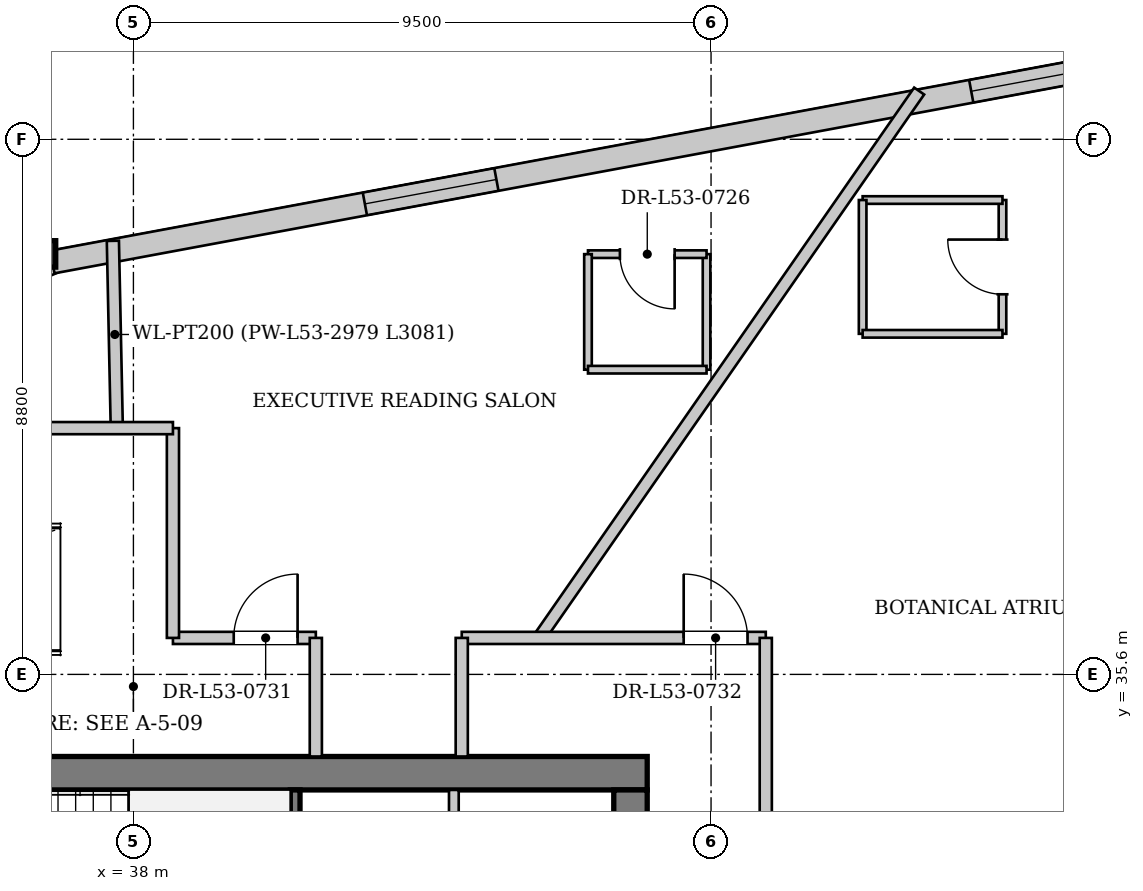
"""IFC4 building model, lengths in metres.
Left out: names, types, materials, properties, quantities, classifications, styles, units other than length and angle.
Written with IfcOpenShell. Run it as: python <this file> out.ifc"""

import sys

from ifc_helpers import new_model, si_unit, direction, frame, frame_2d, origin, origin_2d, place, context, subcontext, project, spatial, rectangle, i_section, extrude, source, transform, mapped, element, fill, save


model = new_model("IFC4")
c1 = context("Model", 3, precision=1e-05, world=origin(), true_north=direction((0.0, 1.0)))
c2 = subcontext(c1, "Body", "Model", "MODEL_VIEW")
j1 = project(units=[si_unit("LENGTHUNIT", "METRE"), si_unit("PLANEANGLEUNIT", "RADIAN")], contexts=[c1])
p1 = place(None, origin())
s1 = spatial("IfcSite", under=j1, at=p1, CompositionType="ELEMENT")
p2 = place(p1, origin())
s2 = spatial("IfcBuilding", under=s1, at=p2, CompositionType="ELEMENT")
p3 = place(p2, frame((0.0, 0.0, 200.3)))
s3 = spatial("IfcBuildingStorey", under=s2, at=p3, CompositionType="ELEMENT", Elevation=200.3)
m1 = source(origin(), c2, "Body", "SweptSolid", [
    extrude(i_section(OverallWidth=0.412, OverallDepth=0.435, WebThickness=0.031, FlangeThickness=0.05, at=origin_2d()), origin(), (0.0, 0.0, 1.0), 3.844),
])
p4 = place(p3, frame((36.633, 42.569, 0.0), z_axis=(-0.060597679022, -0.028139173802, 0.997765557731), x_axis=(0.421167171442, -0.906983028342, 0.0)))
e1 = element("IfcColumn", 1, at=p4, inside=s3, PredefinedType="COLUMN", context=c2, shape_type="MappedRepresentation", body=[
    mapped(m1, transform((0.0, 0.0, 0.0), x_axis=(1.0, 0.0, 0.0), y_axis=(0.0, 1.0, 0.0), z_axis=(0.0, 0.0, 1.0), scale=1.0)),
])
p5 = place(p3, frame((15.966, 33.426, 0.0), z_axis=(0.0, 0.0, 1.0), x_axis=(0.917865013835, 0.396892701341, 0.0)))
e2 = element("IfcWall", 2, at=p5, inside=s3, PredefinedType="SOLIDWALL", context=c2, shape_type="SweptSolid", body=[
    extrude(rectangle(XDim=22.598, YDim=0.38, at=frame_2d((11.299, 0.0))), origin(), (0.0, 0.0, 1.0), 2.972),
])
p6 = place(p5, frame((5.977, 0.0, 0.602)))
e3 = element("IfcOpeningElement", 3, at=p6, cuts=e2, PredefinedType="OPENING", context=c2, shape_type="SweptSolid", body=[
    extrude(rectangle(XDim=2.2, YDim=2.25, at=frame_2d((1.1, 1.125))), frame((0.0, 0.2, 0.0), z_axis=(0.0, -1.0, 0.0), x_axis=(1.0, 0.0, 0.0)), (0.0, 0.0, 1.0), 0.4),
])
p7 = place(p5, frame((16.27, 0.0, 0.602)))
e4 = element("IfcOpeningElement", 4, at=p7, cuts=e2, PredefinedType="OPENING", context=c2, shape_type="SweptSolid", body=[
    extrude(rectangle(XDim=2.2, YDim=2.25, at=frame_2d((1.1, 1.125))), frame((0.0, 0.2, 0.0), z_axis=(0.0, -1.0, 0.0), x_axis=(1.0, 0.0, 0.0)), (0.0, 0.0, 1.0), 0.4),
])
p8 = place(p3, frame((36.667, 42.383, 0.0), z_axis=(0.0, 0.0, 1.0), x_axis=(0.983180478303, 0.182636653177, 0.0)))
e5 = element("IfcWall", 5, at=p8, inside=s3, PredefinedType="SOLIDWALL", context=c2, shape_type="SweptSolid", body=[
    extrude(rectangle(XDim=22.598, YDim=0.38, at=frame_2d((11.299, 0.0))), origin(), (0.0, 0.0, 1.0), 2.972),
])
p9 = place(p8, frame((5.227, 0.0, 0.602)))
e6 = element("IfcOpeningElement", 6, at=p9, cuts=e5, PredefinedType="OPENING", context=c2, shape_type="SweptSolid", body=[
    extrude(rectangle(XDim=2.2, YDim=2.25, at=frame_2d((1.1, 1.125))), frame((0.0, 0.2, 0.0), z_axis=(0.0, -1.0, 0.0), x_axis=(1.0, 0.0, 0.0)), (0.0, 0.0, 1.0), 0.4),
])
p10 = place(p8, frame((15.37, 0.0, 0.602)))
e7 = element("IfcOpeningElement", 7, at=p10, cuts=e5, PredefinedType="OPENING", context=c2, shape_type="SweptSolid", body=[
    extrude(rectangle(XDim=2.2, YDim=2.25, at=frame_2d((1.1, 1.125))), frame((0.0, 0.2, 0.0), z_axis=(0.0, -1.0, 0.0), x_axis=(1.0, 0.0, 0.0)), (0.0, 0.0, 1.0), 0.4),
])
p11 = place(p3, frame((60.64, 44.466, 0.0), z_axis=(0.0, 0.0, 1.0), x_axis=(-0.331792792619, -0.94335228985, 0.0)))
e8 = element("IfcWall", 8, at=p11, inside=s3, PredefinedType="SOLIDWALL", context=c2, shape_type="SweptSolid", body=[
    extrude(rectangle(XDim=23.163, YDim=0.38, at=frame_2d((11.582, 0.0))), origin(), (0.0, 0.0, 1.0), 2.972),
])
p12 = place(p11, frame((5.386, 0.0, 0.602)))
e9 = element("IfcOpeningElement", 9, at=p12, cuts=e8, PredefinedType="OPENING", context=c2, shape_type="SweptSolid", body=[
    extrude(rectangle(XDim=2.2, YDim=2.25, at=frame_2d((1.1, 1.125))), frame((0.0, 0.2, 0.0), z_axis=(0.0, -1.0, 0.0), x_axis=(1.0, 0.0, 0.0)), (0.0, 0.0, 1.0), 0.4),
])
p13 = place(p11, frame((16.027, 0.0, 0.602)))
e10 = element("IfcOpeningElement", 10, at=p13, cuts=e8, PredefinedType="OPENING", context=c2, shape_type="SweptSolid", body=[
    extrude(rectangle(XDim=2.2, YDim=2.25, at=frame_2d((1.1, 1.125))), frame((0.0, 0.2, 0.0), z_axis=(0.0, -1.0, 0.0), x_axis=(1.0, 0.0, 0.0)), (0.0, 0.0, 1.0), 0.4),
])
p14 = place(p3, frame((29.55, 33.975, 0.0), z_axis=(0.0, 0.0, 1.0), x_axis=(1.0, 0.0, 0.0)))
e11 = element("IfcWall", 11, at=p14, inside=s3, PredefinedType="SHEAR", context=c2, shape_type="SweptSolid", body=[
    extrude(rectangle(XDim=16.9, YDim=0.55, at=frame_2d((8.45, 0.0))), origin(), (0.0, 0.0, 1.0), 3.58),
])
p15 = place(p14, frame((1.55, 0.0, 0.0)))
e12 = element("IfcOpeningElement", 12, at=p15, cuts=e11, PredefinedType="OPENING", context=c2, shape_type="SweptSolid", body=[
    extrude(rectangle(XDim=0.95, YDim=2.1, at=frame_2d((0.475, 1.05))), frame((0.0, 0.285, 0.0), z_axis=(0.0, -1.0, 0.0), x_axis=(1.0, 0.0, 0.0)), (0.0, 0.0, 1.0), 0.57),
])
p16 = place(p14, frame((3.93, 0.0, 0.0)))
e13 = element("IfcOpeningElement", 13, at=p16, cuts=e11, PredefinedType="OPENING", context=c2, shape_type="SweptSolid", body=[
    extrude(rectangle(XDim=1.32, YDim=2.2, at=frame_2d((0.66, 1.1))), frame((0.0, 0.285, 0.0), z_axis=(0.0, -1.0, 0.0), x_axis=(1.0, 0.0, 0.0)), (0.0, 0.0, 1.0), 0.57),
])
p17 = place(p3, frame((46.175, 33.7, 0.0), z_axis=(0.0, 0.0, 1.0), x_axis=(0.0, -1.0, 0.0)))
e14 = element("IfcWall", 14, at=p17, inside=s3, PredefinedType="SHEAR", context=c2, shape_type="SweptSolid", body=[
    extrude(rectangle(XDim=14.2, YDim=0.55, at=frame_2d((7.1, 0.0))), origin(), (0.0, 0.0, 1.0), 3.58),
])
p18 = place(p17, frame((5.18, 0.0, 0.0)))
e15 = element("IfcOpeningElement", 15, at=p18, cuts=e14, PredefinedType="OPENING", context=c2, shape_type="SweptSolid", body=[
    extrude(rectangle(XDim=1.6, YDim=2.2, at=frame_2d((0.8, 1.1))), frame((0.0, 0.285, 0.0), z_axis=(0.0, -1.0, 0.0), x_axis=(1.0, 0.0, 0.0)), (0.0, 0.0, 1.0), 0.57),
])
p19 = place(p17, frame((2.05, 0.0, 0.0)))
e16 = element("IfcOpeningElement", 16, at=p19, cuts=e14, PredefinedType="OPENING", context=c2, shape_type="SweptSolid", body=[
    extrude(rectangle(XDim=0.95, YDim=2.1, at=frame_2d((0.475, 1.05))), frame((0.0, 0.285, 0.0), z_axis=(0.0, -1.0, 0.0), x_axis=(1.0, 0.0, 0.0)), (0.0, 0.0, 1.0), 0.57),
])
p20 = place(p3, frame((40.66, 30.6, 0.0), z_axis=(0.0, 0.0, 1.0), x_axis=(0.0, 1.0, 0.0)))
e17 = element("IfcWall", 17, at=p20, inside=s3, PredefinedType="PARTITIONING", context=c2, shape_type="SweptSolid", body=[
    extrude(rectangle(XDim=3.1, YDim=0.16, at=frame_2d((1.55, 0.0))), origin(), (0.0, 0.0, 1.0), 3.58),
])
p21 = place(p3, frame((43.27, 30.68, 0.0), z_axis=(0.0, 0.0, 1.0), x_axis=(0.0, 1.0, 0.0)))
e18 = element("IfcWall", 18, at=p21, inside=s3, PredefinedType="PARTITIONING", context=c2, shape_type="SweptSolid", body=[
    extrude(rectangle(XDim=3.02, YDim=0.16, at=frame_2d((1.51, 0.0))), origin(), (0.0, 0.0, 1.0), 3.58),
])
p22 = place(p21, frame((0.95, 0.0, 0.0)))
e19 = element("IfcOpeningElement", 19, at=p22, cuts=e18, PredefinedType="OPENING", context=c2, shape_type="SweptSolid", body=[
    extrude(rectangle(XDim=0.95, YDim=2.1, at=frame_2d((0.475, 1.05))), frame((0.0, 0.09, 0.0), z_axis=(0.0, -1.0, 0.0), x_axis=(1.0, 0.0, 0.0)), (0.0, 0.0, 1.0), 0.18),
])
p23 = place(p3, frame((37.727, 39.65, 0.0), z_axis=(0.0, 0.0, 1.0), x_axis=(-0.020921228406, 0.999781127148, 0.0)))
e20 = element("IfcWall", 20, at=p23, inside=s3, PredefinedType="PARTITIONING", context=c2, shape_type="SweptSolid", body=[
    extrude(rectangle(XDim=3.081, YDim=0.2, at=frame_2d((1.541, 0.0))), origin(), (0.0, 0.0, 1.0), 3.58),
])
p24 = place(p3, frame((44.672, 36.2, 0.0), z_axis=(0.0, 0.0, 1.0), x_axis=(0.570707826582, 0.821153199274, 0.0)))
e21 = element("IfcWall", 21, at=p24, inside=s3, PredefinedType="PARTITIONING", context=c2, shape_type="SweptSolid", body=[
    extrude(rectangle(XDim=10.952, YDim=0.2, at=frame_2d((5.476, 0.0))), origin(), (0.0, 0.0, 1.0), 3.58),
])
p25 = place(p3, frame((52.293, 41.201, 0.0), z_axis=(0.0, 0.0, 1.0), x_axis=(0.0, 1.0, 0.0)))
e22 = element("IfcWall", 22, at=p25, inside=s3, PredefinedType="PARTITIONING", context=c2, shape_type="SweptSolid", body=[
    extrude(rectangle(XDim=2.2, YDim=0.125, at=frame_2d((1.1, 0.0))), origin(), (0.0, 0.0, 1.0), 3.58),
])
p26 = place(p25, frame((0.65, 0.0, 0.0)))
e23 = element("IfcOpeningElement", 23, at=p26, cuts=e22, PredefinedType="OPENING", context=c2, shape_type="SweptSolid", body=[
    extrude(rectangle(XDim=0.9, YDim=2.1, at=frame_2d((0.45, 1.05))), frame((0.0, 0.073, 0.0), z_axis=(0.0, -1.0, 0.0), x_axis=(1.0, 0.0, 0.0)), (0.0, 0.0, 1.0), 0.145),
])
p27 = place(p3, frame((52.293, 43.401, 0.0), z_axis=(0.0, 0.0, 1.0), x_axis=(-1.0, 0.0, 0.0)))
e24 = element("IfcWall", 24, at=p27, inside=s3, PredefinedType="PARTITIONING", context=c2, shape_type="SweptSolid", body=[
    extrude(rectangle(XDim=2.3, YDim=0.125, at=frame_2d((1.15, 0.0))), origin(), (0.0, 0.0, 1.0), 3.58),
])
p28 = place(p3, frame((49.993, 43.401, 0.0), z_axis=(0.0, 0.0, 1.0), x_axis=(0.0, -1.0, 0.0)))
e25 = element("IfcWall", 25, at=p28, inside=s3, PredefinedType="PARTITIONING", context=c2, shape_type="SweptSolid", body=[
    extrude(rectangle(XDim=2.2, YDim=0.125, at=frame_2d((1.1, 0.0))), origin(), (0.0, 0.0, 1.0), 3.58),
])
p29 = place(p3, frame((49.993, 41.201, 0.0), z_axis=(0.0, 0.0, 1.0), x_axis=(1.0, 0.0, 0.0)))
e26 = element("IfcWall", 26, at=p29, inside=s3, PredefinedType="PARTITIONING", context=c2, shape_type="SweptSolid", body=[
    extrude(rectangle(XDim=2.3, YDim=0.125, at=frame_2d((1.15, 0.0))), origin(), (0.0, 0.0, 1.0), 3.325),
])
p30 = place(p3, frame((47.426, 40.611, 0.0), z_axis=(0.0, 0.0, 1.0), x_axis=(0.0, 1.0, 0.0)))
e27 = element("IfcWall", 27, at=p30, inside=s3, PredefinedType="PARTITIONING", context=c2, shape_type="SweptSolid", body=[
    extrude(rectangle(XDim=1.9, YDim=0.125, at=frame_2d((0.95, 0.0))), origin(), (0.0, 0.0, 1.0), 3.58),
])
p31 = place(p3, frame((47.426, 42.511, 0.0), z_axis=(0.0, 0.0, 1.0), x_axis=(-1.0, 0.0, 0.0)))
e28 = element("IfcWall", 28, at=p31, inside=s3, PredefinedType="PARTITIONING", context=c2, shape_type="SweptSolid", body=[
    extrude(rectangle(XDim=1.95, YDim=0.125, at=frame_2d((0.975, 0.0))), origin(), (0.0, 0.0, 1.0), 3.58),
])
p32 = place(p31, frame((0.525, 0.0, 0.0)))
e29 = element("IfcOpeningElement", 29, at=p32, cuts=e28, PredefinedType="OPENING", context=c2, shape_type="SweptSolid", body=[
    extrude(rectangle(XDim=0.9, YDim=2.1, at=frame_2d((0.45, 1.05))), frame((0.0, 0.073, 0.0), z_axis=(0.0, -1.0, 0.0), x_axis=(1.0, 0.0, 0.0)), (0.0, 0.0, 1.0), 0.145),
])
p33 = place(p3, frame((45.476, 42.511, 0.0), z_axis=(0.0, 0.0, 1.0), x_axis=(0.0, -1.0, 0.0)))
e30 = element("IfcWall", 30, at=p33, inside=s3, PredefinedType="PARTITIONING", context=c2, shape_type="SweptSolid", body=[
    extrude(rectangle(XDim=1.9, YDim=0.125, at=frame_2d((0.95, 0.0))), origin(), (0.0, 0.0, 1.0), 3.58),
])
p34 = place(p3, frame((45.476, 40.611, 0.0), z_axis=(0.0, 0.0, 1.0), x_axis=(1.0, 0.0, 0.0)))
e31 = element("IfcWall", 31, at=p34, inside=s3, PredefinedType="PARTITIONING", context=c2, shape_type="SweptSolid", body=[
    extrude(rectangle(XDim=1.95, YDim=0.125, at=frame_2d((0.975, 0.0))), origin(), (0.0, 0.0, 1.0), 3.325),
])
p35 = place(p3, frame((38.65, 36.2, 0.0), z_axis=(0.0, 0.0, 1.0), x_axis=(1.0, 0.0, 0.0)))
e32 = element("IfcWall", 32, at=p35, inside=s3, PredefinedType="PARTITIONING", context=c2, shape_type="SweptSolid", body=[
    extrude(rectangle(XDim=2.35, YDim=0.2, at=frame_2d((1.175, 0.0))), origin(), (0.0, 0.0, 1.0), 3.58),
])
p36 = place(p35, frame((1.0, 0.0, 0.0)))
e33 = element("IfcOpeningElement", 33, at=p36, cuts=e32, PredefinedType="OPENING", context=c2, shape_type="SweptSolid", body=[
    extrude(rectangle(XDim=1.05, YDim=2.2, at=frame_2d((0.525, 1.1))), frame((0.0, 0.11, 0.0), z_axis=(0.0, -1.0, 0.0), x_axis=(1.0, 0.0, 0.0)), (0.0, 0.0, 1.0), 0.22),
])
p37 = place(p3, frame((41.0, 34.25, 0.0), z_axis=(0.0, 0.0, 1.0), x_axis=(0.0, 1.0, 0.0)))
e34 = element("IfcWall", 34, at=p37, inside=s3, PredefinedType="PARTITIONING", context=c2, shape_type="SweptSolid", body=[
    extrude(rectangle(XDim=1.95, YDim=0.2, at=frame_2d((0.975, 0.0))), origin(), (0.0, 0.0, 1.0), 3.58),
])
p38 = place(p3, frame((43.4, 36.2, 0.0), z_axis=(0.0, 0.0, 1.0), x_axis=(1.0, 0.0, 0.0)))
e35 = element("IfcWall", 35, at=p38, inside=s3, PredefinedType="PARTITIONING", context=c2, shape_type="SweptSolid", body=[
    extrude(rectangle(XDim=5.0, YDim=0.2, at=frame_2d((2.5, 0.0))), origin(), (0.0, 0.0, 1.0), 3.58),
])
p39 = place(p38, frame((3.65, 0.0, 0.0)))
e36 = element("IfcOpeningElement", 36, at=p39, cuts=e35, PredefinedType="OPENING", context=c2, shape_type="SweptSolid", body=[
    extrude(rectangle(XDim=1.05, YDim=2.2, at=frame_2d((0.525, 1.1))), frame((0.0, 0.11, 0.0), z_axis=(0.0, -1.0, 0.0), x_axis=(1.0, 0.0, 0.0)), (0.0, 0.0, 1.0), 0.22),
])
p40 = place(p3, frame((43.4, 34.25, 0.0), z_axis=(0.0, 0.0, 1.0), x_axis=(0.0, 1.0, 0.0)))
e37 = element("IfcWall", 37, at=p40, inside=s3, PredefinedType="PARTITIONING", context=c2, shape_type="SweptSolid", body=[
    extrude(rectangle(XDim=1.95, YDim=0.2, at=frame_2d((0.975, 0.0))), origin(), (0.0, 0.0, 1.0), 3.58),
])
p41 = place(p3, frame((48.4, 17.0, 0.0), z_axis=(0.0, 0.0, 1.0), x_axis=(0.0, 1.0, 0.0)))
e38 = element("IfcWall", 38, at=p41, inside=s3, PredefinedType="PARTITIONING", context=c2, shape_type="SweptSolid", body=[
    extrude(rectangle(XDim=19.2, YDim=0.2, at=frame_2d((9.6, 0.0))), origin(), (0.0, 0.0, 1.0), 3.58),
])
p42 = place(p41, frame((8.165, 0.0, 0.0)))
e39 = element("IfcOpeningElement", 39, at=p42, cuts=e38, PredefinedType="OPENING", context=c2, shape_type="SweptSolid", body=[
    extrude(rectangle(XDim=1.05, YDim=2.2, at=frame_2d((0.525, 1.1))), frame((0.0, 0.11, 0.0), z_axis=(0.0, -1.0, 0.0), x_axis=(1.0, 0.0, 0.0)), (0.0, 0.0, 1.0), 0.22),
])
p43 = place(p3, frame((38.65, 36.2, 0.0), z_axis=(0.0, 0.0, 1.0), x_axis=(0.0, 1.0, 0.0)))
e40 = element("IfcWall", 40, at=p43, inside=s3, PredefinedType="PARTITIONING", context=c2, shape_type="SweptSolid", body=[
    extrude(rectangle(XDim=3.45, YDim=0.2, at=frame_2d((1.725, 0.0))), origin(), (0.0, 0.0, 1.0), 3.58),
])
p44 = place(p3, frame((29.957, 39.65, 0.0), z_axis=(0.0, 0.0, 1.0), x_axis=(1.0, 0.0, 0.0)))
e41 = element("IfcWall", 41, at=p44, inside=s3, PredefinedType="PARTITIONING", context=c2, shape_type="SweptSolid", body=[
    extrude(rectangle(XDim=8.693, YDim=0.2, at=frame_2d((4.346, 0.0))), origin(), (0.0, 0.0, 1.0), 2.965),
])
m2 = source(origin(), c2, "Body", "SweptSolid", [
    extrude(rectangle(XDim=2.2, YDim=2.25, at=frame_2d((1.1, 1.125))), frame((0.0, 0.03, 0.0), z_axis=(0.0, -1.0, 0.0), x_axis=(1.0, 0.0, 0.0)), (0.0, 0.0, 1.0), 0.06),
])
p45 = place(p9, origin())
e42 = element("IfcWindow", 42, at=p45, inside=s3, PartitioningType="SINGLE_PANEL", PredefinedType="WINDOW", context=c2, shape_type="MappedRepresentation", body=[
    mapped(m2, transform((0.0, 0.0, 0.0), x_axis=(1.0, 0.0, 0.0), y_axis=(0.0, 1.0, 0.0), z_axis=(0.0, 0.0, 1.0), scale=1.0)),
])
fill(e6, e42)
p46 = place(p10, origin())
e43 = element("IfcWindow", 43, at=p46, inside=s3, PartitioningType="SINGLE_PANEL", PredefinedType="WINDOW", context=c2, shape_type="MappedRepresentation", body=[
    mapped(m2, transform((0.0, 0.0, 0.0), x_axis=(1.0, 0.0, 0.0), y_axis=(0.0, 1.0, 0.0), z_axis=(0.0, 0.0, 1.0), scale=1.0)),
])
fill(e7, e43)
m3 = source(origin(), c2, "Body", "SweptSolid", [
    extrude(rectangle(XDim=0.9, YDim=2.1, at=frame_2d((0.45, 1.05))), frame((0.0, 0.025, 0.0), z_axis=(0.0, -1.0, 0.0), x_axis=(1.0, 0.0, 0.0)), (0.0, 0.0, 1.0), 0.05),
])
p47 = place(p26, origin())
e44 = element("IfcDoor", 44, at=p47, inside=s3, OperationType="SINGLE_SWING_RIGHT", PredefinedType="DOOR", context=c2, shape_type="MappedRepresentation", body=[
    mapped(m3, transform((0.0, 0.0, 0.0), x_axis=(1.0, 0.0, 0.0), y_axis=(0.0, 1.0, 0.0), z_axis=(0.0, 0.0, 1.0), scale=1.0)),
])
fill(e23, e44)
p48 = place(p32, origin())
e45 = element("IfcDoor", 45, at=p48, inside=s3, OperationType="SINGLE_SWING_LEFT", PredefinedType="DOOR", context=c2, shape_type="MappedRepresentation", body=[
    mapped(m3, transform((0.0, 0.0, 0.0), x_axis=(1.0, 0.0, 0.0), y_axis=(0.0, 1.0, 0.0), z_axis=(0.0, 0.0, 1.0), scale=1.0)),
])
fill(e29, e45)
m4 = source(origin(), c2, "Body", "SweptSolid", [
    extrude(rectangle(XDim=1.05, YDim=2.2, at=frame_2d((0.525, 1.1))), frame((0.0, 0.025, 0.0), z_axis=(0.0, -1.0, 0.0), x_axis=(1.0, 0.0, 0.0)), (0.0, 0.0, 1.0), 0.05),
])
p49 = place(p36, origin())
e46 = element("IfcDoor", 46, at=p49, inside=s3, OperationType="SINGLE_SWING_RIGHT", PredefinedType="DOOR", context=c2, shape_type="MappedRepresentation", body=[
    mapped(m4, transform((0.0, 0.0, 0.0), x_axis=(1.0, 0.0, 0.0), y_axis=(0.0, 1.0, 0.0), z_axis=(0.0, 0.0, 1.0), scale=1.0)),
])
fill(e33, e46)
p50 = place(p39, origin())
e47 = element("IfcDoor", 47, at=p50, inside=s3, OperationType="SINGLE_SWING_LEFT", PredefinedType="DOOR", context=c2, shape_type="MappedRepresentation", body=[
    mapped(m4, transform((0.0, 0.0, 0.0), x_axis=(1.0, 0.0, 0.0), y_axis=(0.0, 1.0, 0.0), z_axis=(0.0, 0.0, 1.0), scale=1.0)),
])
fill(e36, e47)
save(model, sys.argv[1])
